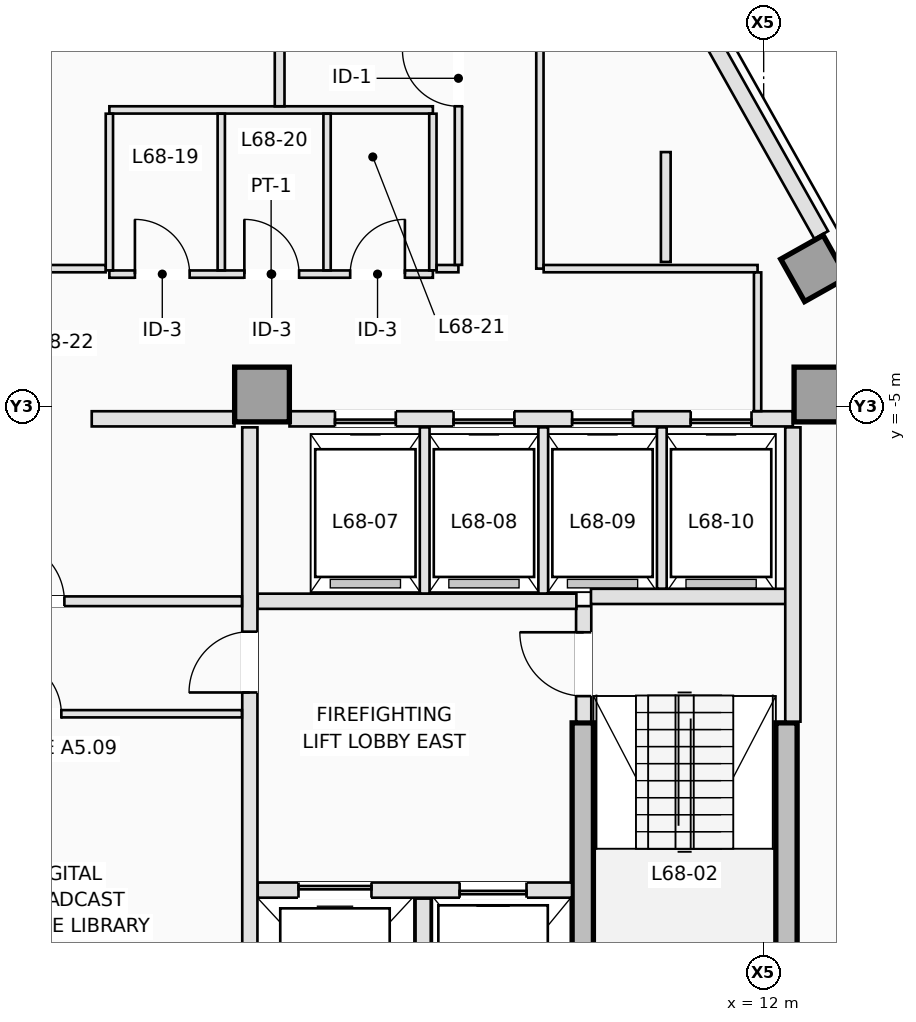
"""IFC4 building model, lengths in metres.
Left out: names, types, materials, properties, quantities, classifications, styles, units other than length and angle.
Written with IfcOpenShell. Run it as: python <this file> out.ifc"""

import sys

from ifc_helpers import new_model, si_unit, direction, frame, frame_2d, origin, origin_2d, place, context, subcontext, project, spatial, rectangle, extrude, element, fill, save


model = new_model("IFC4")
c1 = context("Model", 3, precision=1e-05, world=origin(), true_north=direction((0.0, 1.0)))
c2 = subcontext(c1, "Body", "Model", "MODEL_VIEW")
j1 = project(units=[si_unit("LENGTHUNIT", "METRE"), si_unit("PLANEANGLEUNIT", "RADIAN")], contexts=[c1])
p1 = place(None, origin())
s1 = spatial("IfcSite", under=j1, at=p1, CompositionType="ELEMENT")
p2 = place(p1, origin())
s2 = spatial("IfcBuilding", under=s1, at=p2, CompositionType="ELEMENT")
p3 = place(p2, frame((0.0, 0.0, 246.4)))
s3 = spatial("IfcBuildingStorey", under=s2, at=p3, CompositionType="ELEMENT", Elevation=246.4)
p4 = place(p3, frame((12.375, -15.675, 0.0), z_axis=(0.0, 0.0, 1.0), x_axis=(0.0, 1.0, 0.0)))
e1 = element("IfcWall", 1, at=p4, inside=s3, PredefinedType="SHEAR", context=c2, shape_type="SweptSolid", body=[
    extrude(rectangle(XDim=5.475, YDim=0.35, at=frame_2d((2.738, 0.0))), origin(), (0.0, 0.0, 1.0), 3.5),
])
p5 = place(p3, frame((9.025, -16.15, 0.0), z_axis=(0.0, 0.0, 1.0), x_axis=(0.0, 1.0, 0.0)))
e2 = element("IfcWall", 2, at=p5, inside=s3, PredefinedType="SHEAR", context=c2, shape_type="SweptSolid", body=[
    extrude(rectangle(XDim=5.95, YDim=0.35, at=frame_2d((2.975, 0.0))), origin(), (0.0, 0.0, 1.0), 3.5),
])
for number, where, z_axis, x_axis in (
    (3, (3.75, -4.8, 0.0), (0.0, 0.0, 1.0), (1.0, 0.0, 0.0)),
    (4, (12.95, -4.8, 0.0), (0.0, 0.0, 1.0), (1.0, 0.0, 0.0)),
):
    element("IfcColumn", number, at=place(p3, frame(where, z_axis=z_axis, x_axis=x_axis)), inside=s3, PredefinedType="COLUMN", context=c2, shape_type="SweptSolid", body=[
        extrude(rectangle(XDim=0.9, YDim=0.9, at=origin_2d()), origin(), (0.0, 0.0, 1.0), 3.5),
    ])
p6 = place(p3, frame((12.825, -2.727, 0.0), z_axis=(0.0, 0.0, 1.0), x_axis=(0.871575139605, 0.490261946333, 0.0)))
e5 = element("IfcColumn", 5, at=p6, inside=s3, PredefinedType="COLUMN", context=c2, shape_type="SweptSolid", body=[
    extrude(rectangle(XDim=0.8, YDim=0.8, at=origin_2d()), origin(), (0.0, 0.0, 1.0), 3.5),
])
p7 = place(p3, frame((10.869, 1.516, 0.0), z_axis=(0.0, 0.0, 1.0), x_axis=(0.490244825075, -0.871584770109, 0.0)))
e6 = element("IfcWall", 6, at=p7, inside=s3, PredefinedType="STANDARD", context=c2, shape_type="SweptSolid", body=[
    extrude(rectangle(XDim=4.237, YDim=0.26, at=frame_2d((2.119, 0.0))), origin(), (0.0, 0.0, 1.0), 3.25),
])
p8 = place(p3, frame((9.04, -10.18, 0.0), z_axis=(0.0, 0.0, 1.0), x_axis=(0.0, 1.0, 0.0)))
e7 = element("IfcWall", 7, at=p8, inside=s3, PredefinedType="PARTITIONING", context=c2, shape_type="SweptSolid", body=[
    extrude(rectangle(XDim=1.9, YDim=0.25, at=frame_2d((0.95, 0.0))), origin(), (0.0, 0.0, 1.0), 3.25),
])
p9 = place(p8, frame((0.42, 0.0, 0.0)))
e8 = element("IfcOpeningElement", 8, at=p9, cuts=e7, PredefinedType="OPENING", context=c2, shape_type="SweptSolid", body=[
    extrude(rectangle(XDim=1.05, YDim=2.15, at=frame_2d((0.525, 1.075))), frame((0.0, 0.135, 0.0), z_axis=(0.0, -1.0, 0.0), x_axis=(1.0, 0.0, 0.0)), (0.0, 0.0, 1.0), 0.27),
])
p10 = place(p3, frame((9.16, -8.12, 0.0), z_axis=(0.0, 0.0, 1.0), x_axis=(1.0, 0.0, 0.0)))
e9 = element("IfcWall", 9, at=p10, inside=s3, PredefinedType="PARTITIONING", context=c2, shape_type="SweptSolid", body=[
    extrude(rectangle(XDim=3.22, YDim=0.25, at=frame_2d((1.61, 0.0))), origin(), (0.0, 0.0, 1.0), 3.25),
])
p11 = place(p3, frame((12.48, -10.18, 0.0), z_axis=(0.0, 0.0, 1.0), x_axis=(0.0, 1.0, 0.0)))
e10 = element("IfcWall", 10, at=p11, inside=s3, PredefinedType="PARTITIONING", context=c2, shape_type="SweptSolid", body=[
    extrude(rectangle(XDim=4.84, YDim=0.25, at=frame_2d((2.42, 0.0))), origin(), (0.0, 0.0, 1.0), 3.25),
])
p12 = place(p3, frame((3.68, -12.95, 0.0), z_axis=(0.0, 0.0, 1.0), x_axis=(1.0, 0.0, 0.0)))
e11 = element("IfcWall", 11, at=p12, inside=s3, PredefinedType="PARTITIONING", context=c2, shape_type="SweptSolid", body=[
    extrude(rectangle(XDim=5.168, YDim=0.25, at=frame_2d((2.584, 0.0))), origin(), (0.0, 0.0, 1.0), 3.25),
])
p13 = place(p12, frame((3.32, 0.0, 0.0)))
e12 = element("IfcOpeningElement", 12, at=p13, cuts=e11, PredefinedType="OPENING", context=c2, shape_type="SweptSolid", body=[
    extrude(rectangle(XDim=1.1, YDim=2.15, at=frame_2d((0.55, 1.075))), frame((0.0, 0.135, 0.0), z_axis=(0.0, -1.0, 0.0), x_axis=(1.0, 0.0, 0.0)), (0.0, 0.0, 1.0), 0.27),
])
p14 = place(p12, frame((0.67, 0.0, 0.0)))
e13 = element("IfcOpeningElement", 13, at=p14, cuts=e11, PredefinedType="OPENING", context=c2, shape_type="SweptSolid", body=[
    extrude(rectangle(XDim=1.2, YDim=2.15, at=frame_2d((0.6, 1.075))), frame((0.0, 0.135, 0.0), z_axis=(0.0, -1.0, 0.0), x_axis=(1.0, 0.0, 0.0)), (0.0, 0.0, 1.0), 0.27),
])
p15 = place(p3, frame((6.4, -15.92, 0.0), z_axis=(0.0, 0.0, 1.0), x_axis=(0.0, 1.0, 0.0)))
e14 = element("IfcWall", 14, at=p15, inside=s3, PredefinedType="PARTITIONING", context=c2, shape_type="SweptSolid", body=[
    extrude(rectangle(XDim=2.83, YDim=0.25, at=frame_2d((1.415, 0.0))), origin(), (0.0, 0.0, 1.0), 3.25),
])
p16 = place(p3, frame((3.68, -8.2, 0.0), z_axis=(0.0, 0.0, 1.0), x_axis=(1.0, 0.0, 0.0)))
e15 = element("IfcWall", 15, at=p16, inside=s3, PredefinedType="PARTITIONING", context=c2, shape_type="SweptSolid", body=[
    extrude(rectangle(XDim=5.24, YDim=0.25, at=frame_2d((2.62, 0.0))), origin(), (0.0, 0.0, 1.0), 3.25),
])
p17 = place(p3, frame((3.55, -15.898, 0.0), z_axis=(0.0, 0.0, 1.0), x_axis=(0.0, 1.0, 0.0)))
e16 = element("IfcWall", 16, at=p17, inside=s3, PredefinedType="PARTITIONING", context=c2, shape_type="SweptSolid", body=[
    extrude(rectangle(XDim=10.558, YDim=0.25, at=frame_2d((5.279, 0.0))), origin(), (0.0, 0.0, 1.0), 3.25),
])
p18 = place(p17, frame((6.198, 0.0, 0.0)))
e17 = element("IfcOpeningElement", 17, at=p18, cuts=e16, PredefinedType="OPENING", context=c2, shape_type="SweptSolid", body=[
    extrude(rectangle(XDim=1.0, YDim=2.15, at=frame_2d((0.5, 1.075))), frame((0.0, 0.135, 0.0), z_axis=(0.0, -1.0, 0.0), x_axis=(1.0, 0.0, 0.0)), (0.0, 0.0, 1.0), 0.27),
])
p19 = place(p3, frame((4.202, -5.2, 0.0), z_axis=(0.0, 0.0, 1.0), x_axis=(1.0, 0.0, 0.0)))
e18 = element("IfcWall", 18, at=p19, inside=s3, PredefinedType="PARTITIONING", context=c2, shape_type="SweptSolid", body=[
    extrude(rectangle(XDim=8.278, YDim=0.25, at=frame_2d((4.139, 0.0))), origin(), (0.0, 0.0, 1.0), 3.25),
])
p20 = place(p19, frame((0.748, 0.0, 0.0)))
e19 = element("IfcOpeningElement", 19, at=p20, cuts=e18, PredefinedType="OPENING", context=c2, shape_type="SweptSolid", body=[
    extrude(rectangle(XDim=1.0, YDim=2.15, at=frame_2d((0.5, 1.075))), frame((0.0, 0.135, 0.0), z_axis=(0.0, -1.0, 0.0), x_axis=(1.0, 0.0, 0.0)), (0.0, 0.0, 1.0), 0.27),
])
p21 = place(p19, frame((2.698, 0.0, 0.0)))
e20 = element("IfcOpeningElement", 20, at=p21, cuts=e18, PredefinedType="OPENING", context=c2, shape_type="SweptSolid", body=[
    extrude(rectangle(XDim=1.0, YDim=2.15, at=frame_2d((0.5, 1.075))), frame((0.0, 0.135, 0.0), z_axis=(0.0, -1.0, 0.0), x_axis=(1.0, 0.0, 0.0)), (0.0, 0.0, 1.0), 0.27),
])
p22 = place(p19, frame((4.648, 0.0, 0.0)))
e21 = element("IfcOpeningElement", 21, at=p22, cuts=e18, PredefinedType="OPENING", context=c2, shape_type="SweptSolid", body=[
    extrude(rectangle(XDim=1.0, YDim=2.15, at=frame_2d((0.5, 1.075))), frame((0.0, 0.135, 0.0), z_axis=(0.0, -1.0, 0.0), x_axis=(1.0, 0.0, 0.0)), (0.0, 0.0, 1.0), 0.27),
])
p23 = place(p19, frame((6.598, 0.0, 0.0)))
e22 = element("IfcOpeningElement", 22, at=p23, cuts=e18, PredefinedType="OPENING", context=c2, shape_type="SweptSolid", body=[
    extrude(rectangle(XDim=1.0, YDim=2.15, at=frame_2d((0.5, 1.075))), frame((0.0, 0.135, 0.0), z_axis=(0.0, -1.0, 0.0), x_axis=(1.0, 0.0, 0.0)), (0.0, 0.0, 1.0), 0.27),
])
p24 = place(p3, frame((0.95, -5.2, 0.0), z_axis=(0.0, 0.0, 1.0), x_axis=(1.0, 0.0, 0.0)))
e23 = element("IfcWall", 23, at=p24, inside=s3, PredefinedType="PARTITIONING", context=c2, shape_type="SweptSolid", body=[
    extrude(rectangle(XDim=2.348, YDim=0.25, at=frame_2d((1.174, 0.0))), origin(), (0.0, 0.0, 1.0), 3.25),
])
for number, where, z_axis, x_axis in (
    (24, (6.425, -8.073, 0.0), (0.0, 0.0, 1.0), (0.0, 1.0, 0.0)),
    (25, (8.375, -8.073, 0.0), (0.0, 0.0, 1.0), (0.0, 1.0, 0.0)),
):
    element("IfcWall", number, at=place(p3, frame(where, z_axis=z_axis, x_axis=x_axis)), inside=s3, PredefinedType="PARTITIONING", context=c2, shape_type="SweptSolid", body=[
        extrude(rectangle(XDim=2.733, YDim=0.16, at=frame_2d((1.366, 0.0))), origin(), (0.0, 0.0, 1.0), 3.25),
    ])
p25 = place(p3, frame((10.325, -7.993, 0.0), z_axis=(0.0, 0.0, 1.0), x_axis=(0.0, 1.0, 0.0)))
e26 = element("IfcWall", 26, at=p25, inside=s3, PredefinedType="PARTITIONING", context=c2, shape_type="SweptSolid", body=[
    extrude(rectangle(XDim=2.653, YDim=0.16, at=frame_2d((1.326, 0.0))), origin(), (0.0, 0.0, 1.0), 3.25),
])
p26 = place(p3, frame((-3.42, -8.2, 0.0), z_axis=(0.0, 0.0, 1.0), x_axis=(1.0, 0.0, 0.0)))
e27 = element("IfcWall", 27, at=p26, inside=s3, PredefinedType="PARTITIONING", context=c2, shape_type="SweptSolid", body=[
    extrude(rectangle(XDim=6.84, YDim=0.16, at=frame_2d((3.42, 0.0))), origin(), (0.0, 0.0, 1.0), 3.25),
])
p27 = place(p26, frame((2.92, 0.0, 0.0)))
e28 = element("IfcOpeningElement", 28, at=p27, cuts=e27, PredefinedType="OPENING", context=c2, shape_type="SweptSolid", body=[
    extrude(rectangle(XDim=1.0, YDim=2.15, at=frame_2d((0.5, 1.075))), frame((0.0, 0.09, 0.0), z_axis=(0.0, -1.0, 0.0), x_axis=(1.0, 0.0, 0.0)), (0.0, 0.0, 1.0), 0.18),
])
p28 = place(p3, frame((-3.42, -10.05, 0.0), z_axis=(0.0, 0.0, 1.0), x_axis=(1.0, 0.0, 0.0)))
e29 = element("IfcWall", 29, at=p28, inside=s3, PredefinedType="PARTITIONING", context=c2, shape_type="SweptSolid", body=[
    extrude(rectangle(XDim=6.84, YDim=0.12, at=frame_2d((3.42, 0.0))), origin(), (0.0, 0.0, 1.0), 3.25),
])
p29 = place(p28, frame((2.95, 0.0, 0.0)))
e30 = element("IfcOpeningElement", 30, at=p29, cuts=e29, PredefinedType="OPENING", context=c2, shape_type="SweptSolid", body=[
    extrude(rectangle(XDim=0.92, YDim=2.12, at=frame_2d((0.46, 1.06))), frame((0.0, 0.07, 0.0), z_axis=(0.0, -1.0, 0.0), x_axis=(1.0, 0.0, 0.0)), (0.0, 0.0, 1.0), 0.14),
])
p30 = place(p3, frame((1.24, -2.82, 0.0), z_axis=(0.0, 0.0, 1.0), x_axis=(1.0, 0.0, 0.0)))
e31 = element("IfcWall", 31, at=p30, inside=s3, PredefinedType="PARTITIONING", context=c2, shape_type="SweptSolid", body=[
    extrude(rectangle(XDim=5.32, YDim=0.12, at=frame_2d((2.66, 0.0))), origin(), (0.0, 0.0, 1.0), 2.943),
])
p31 = place(p30, frame((0.42, 0.0, 0.0)))
e32 = element("IfcOpeningElement", 32, at=p31, cuts=e31, PredefinedType="OPENING", context=c2, shape_type="SweptSolid", body=[
    extrude(rectangle(XDim=0.9, YDim=2.12, at=frame_2d((0.45, 1.06))), frame((0.0, 0.07, 0.0), z_axis=(0.0, -1.0, 0.0), x_axis=(1.0, 0.0, 0.0)), (0.0, 0.0, 1.0), 0.14),
])
p32 = place(p30, frame((2.22, 0.0, 0.0)))
e33 = element("IfcOpeningElement", 33, at=p32, cuts=e31, PredefinedType="OPENING", context=c2, shape_type="SweptSolid", body=[
    extrude(rectangle(XDim=0.9, YDim=2.12, at=frame_2d((0.45, 1.06))), frame((0.0, 0.07, 0.0), z_axis=(0.0, -1.0, 0.0), x_axis=(1.0, 0.0, 0.0)), (0.0, 0.0, 1.0), 0.14),
])
p33 = place(p30, frame((3.96, 0.0, 0.0)))
e34 = element("IfcOpeningElement", 34, at=p33, cuts=e31, PredefinedType="OPENING", context=c2, shape_type="SweptSolid", body=[
    extrude(rectangle(XDim=0.9, YDim=2.12, at=frame_2d((0.45, 1.06))), frame((0.0, 0.07, 0.0), z_axis=(0.0, -1.0, 0.0), x_axis=(1.0, 0.0, 0.0)), (0.0, 0.0, 1.0), 0.14),
])
p34 = place(p3, frame((1.24, -0.12, 0.0), z_axis=(0.0, 0.0, 1.0), x_axis=(1.0, 0.0, 0.0)))
e35 = element("IfcWall", 35, at=p34, inside=s3, PredefinedType="PARTITIONING", context=c2, shape_type="SweptSolid", body=[
    extrude(rectangle(XDim=5.32, YDim=0.12, at=frame_2d((2.66, 0.0))), origin(), (0.0, 0.0, 1.0), 3.25),
])
for number, where, z_axis, x_axis in (
    (36, (1.24, -2.758, 0.0), (0.0, 0.0, 1.0), (0.0, 1.0, 0.0)),
    (37, (3.08, -2.758, 0.0), (0.0, 0.0, 1.0), (0.0, 1.0, 0.0)),
    (38, (4.82, -2.758, 0.0), (0.0, 0.0, 1.0), (0.0, 1.0, 0.0)),
    (39, (6.56, -2.758, 0.0), (0.0, 0.0, 1.0), (0.0, 1.0, 0.0)),
):
    element("IfcWall", number, at=place(p3, frame(where, z_axis=z_axis, x_axis=x_axis)), inside=s3, PredefinedType="PARTITIONING", context=c2, shape_type="SweptSolid", body=[
        extrude(rectangle(XDim=2.576, YDim=0.12, at=frame_2d((1.288, 0.0))), origin(), (0.0, 0.0, 1.0), 3.25),
    ])
p35 = place(p3, frame((-7.568, -2.73, 0.0), z_axis=(0.0, 0.0, 1.0), x_axis=(1.0, 0.0, 0.0)))
e40 = element("IfcWall", 40, at=p35, inside=s3, PredefinedType="PARTITIONING", context=c2, shape_type="SweptSolid", body=[
    extrude(rectangle(XDim=8.746, YDim=0.12, at=frame_2d((4.373, 0.0))), origin(), (0.0, 0.0, 1.0), 2.943),
])
p36 = place(p35, frame((6.264, 0.0, 0.0)))
e41 = element("IfcOpeningElement", 41, at=p36, cuts=e40, PredefinedType="OPENING", context=c2, shape_type="SweptSolid", body=[
    extrude(rectangle(XDim=0.92, YDim=2.12, at=frame_2d((0.46, 1.06))), frame((0.0, 0.07, 0.0), z_axis=(0.0, -1.0, 0.0), x_axis=(1.0, 0.0, 0.0)), (0.0, 0.0, 1.0), 0.14),
])
p37 = place(p35, frame((2.072, 0.0, 0.0)))
e42 = element("IfcOpeningElement", 42, at=p37, cuts=e40, PredefinedType="OPENING", context=c2, shape_type="SweptSolid", body=[
    extrude(rectangle(XDim=0.92, YDim=2.12, at=frame_2d((0.46, 1.06))), frame((0.0, 0.07, 0.0), z_axis=(0.0, -1.0, 0.0), x_axis=(1.0, 0.0, 0.0)), (0.0, 0.0, 1.0), 0.14),
])
p38 = place(p3, frame((6.622, -2.73, 0.0), z_axis=(0.0, 0.0, 1.0), x_axis=(1.0, 0.0, 0.0)))
e43 = element("IfcWall", 43, at=p38, inside=s3, PredefinedType="PARTITIONING", context=c2, shape_type="SweptSolid", body=[
    extrude(rectangle(XDim=0.358, YDim=0.12, at=frame_2d((0.179, 0.0))), origin(), (0.0, 0.0, 1.0), 3.25),
])
p39 = place(p3, frame((6.98, -2.668, 0.0), z_axis=(0.0, 0.0, 1.0), x_axis=(0.0, 1.0, 0.0)))
e44 = element("IfcWall", 44, at=p39, inside=s3, PredefinedType="PARTITIONING", context=c2, shape_type="SweptSolid", body=[
    extrude(rectangle(XDim=4.518, YDim=0.12, at=frame_2d((2.259, 0.0))), origin(), (0.0, 0.0, 1.0), 3.25),
])
p40 = place(p39, frame((2.608, 0.0, 0.0)))
e45 = element("IfcOpeningElement", 45, at=p40, cuts=e44, PredefinedType="OPENING", context=c2, shape_type="SweptSolid", body=[
    extrude(rectangle(XDim=0.92, YDim=2.12, at=frame_2d((0.46, 1.06))), frame((0.0, 0.07, 0.0), z_axis=(0.0, -1.0, 0.0), x_axis=(1.0, 0.0, 0.0)), (0.0, 0.0, 1.0), 0.14),
])
p41 = place(p3, frame((8.32, 1.788, 0.0), z_axis=(0.0, 0.0, 1.0), x_axis=(0.0, -1.0, 0.0)))
e46 = element("IfcWall", 46, at=p41, inside=s3, PredefinedType="PARTITIONING", context=c2, shape_type="SweptSolid", body=[
    extrude(rectangle(XDim=4.518, YDim=0.12, at=frame_2d((2.259, 0.0))), origin(), (0.0, 0.0, 1.0), 3.25),
])
p42 = place(p3, frame((8.382, -2.73, 0.0), z_axis=(0.0, 0.0, 1.0), x_axis=(1.0, 0.0, 0.0)))
e47 = element("IfcWall", 47, at=p42, inside=s3, PredefinedType="PARTITIONING", context=c2, shape_type="SweptSolid", body=[
    extrude(rectangle(XDim=3.518, YDim=0.12, at=frame_2d((1.759, 0.0))), origin(), (0.0, 0.0, 1.0), 3.25),
])
p43 = place(p3, frame((11.9, -2.792, 0.0), z_axis=(0.0, 0.0, 1.0), x_axis=(0.0, -1.0, 0.0)))
e48 = element("IfcWall", 48, at=p43, inside=s3, PredefinedType="PARTITIONING", context=c2, shape_type="SweptSolid", body=[
    extrude(rectangle(XDim=2.281, YDim=0.12, at=frame_2d((1.141, 0.0))), origin(), (0.0, 0.0, 1.0), 3.25),
])
p44 = place(p3, frame((4.04, 7.312, 0.0), z_axis=(0.0, 0.0, 1.0), x_axis=(0.0, -1.0, 0.0)))
e49 = element("IfcWall", 49, at=p44, inside=s3, PredefinedType="PARTITIONING", context=c2, shape_type="SweptSolid", body=[
    extrude(rectangle(XDim=7.372, YDim=0.16, at=frame_2d((3.686, 0.0))), origin(), (0.0, 0.0, 1.0), 3.25),
])
p45 = place(p3, frame((10.39, -0.813, 0.0), z_axis=(0.0, 0.0, 1.0), x_axis=(0.0, -1.0, 0.0)))
e50 = element("IfcWall", 50, at=p45, inside=s3, PredefinedType="PARTITIONING", context=c2, shape_type="SweptSolid", body=[
    extrude(rectangle(XDim=1.807, YDim=0.16, at=frame_2d((0.903, 0.0))), origin(), (0.0, 0.0, 1.0), 3.25),
])
p46 = place(p20, origin())
e51 = element("IfcDoor", 51, at=p46, inside=s3, OperationType="SLIDING_TO_RIGHT", PredefinedType="DOOR", context=c2, shape_type="SweptSolid", body=[
    extrude(rectangle(XDim=1.0, YDim=2.15, at=frame_2d((0.5, 1.075))), frame((0.0, 0.025, 0.0), z_axis=(0.0, -1.0, 0.0), x_axis=(1.0, 0.0, 0.0)), (0.0, 0.0, 1.0), 0.05),
])
fill(e19, e51)
p47 = place(p21, origin())
e52 = element("IfcDoor", 52, at=p47, inside=s3, OperationType="SLIDING_TO_RIGHT", PredefinedType="DOOR", context=c2, shape_type="SweptSolid", body=[
    extrude(rectangle(XDim=1.0, YDim=2.15, at=frame_2d((0.5, 1.075))), frame((0.0, 0.025, 0.0), z_axis=(0.0, -1.0, 0.0), x_axis=(1.0, 0.0, 0.0)), (0.0, 0.0, 1.0), 0.05),
])
fill(e20, e52)
p48 = place(p22, origin())
e53 = element("IfcDoor", 53, at=p48, inside=s3, OperationType="SLIDING_TO_RIGHT", PredefinedType="DOOR", context=c2, shape_type="SweptSolid", body=[
    extrude(rectangle(XDim=1.0, YDim=2.15, at=frame_2d((0.5, 1.075))), frame((0.0, 0.025, 0.0), z_axis=(0.0, -1.0, 0.0), x_axis=(1.0, 0.0, 0.0)), (0.0, 0.0, 1.0), 0.05),
])
fill(e21, e53)
p49 = place(p23, origin())
e54 = element("IfcDoor", 54, at=p49, inside=s3, OperationType="SLIDING_TO_RIGHT", PredefinedType="DOOR", context=c2, shape_type="SweptSolid", body=[
    extrude(rectangle(XDim=1.0, YDim=2.15, at=frame_2d((0.5, 1.075))), frame((0.0, 0.025, 0.0), z_axis=(0.0, -1.0, 0.0), x_axis=(1.0, 0.0, 0.0)), (0.0, 0.0, 1.0), 0.05),
])
fill(e22, e54)
p50 = place(p13, origin())
e55 = element("IfcDoor", 55, at=p50, inside=s3, OperationType="SLIDING_TO_RIGHT", PredefinedType="DOOR", context=c2, shape_type="SweptSolid", body=[
    extrude(rectangle(XDim=1.1, YDim=2.15, at=frame_2d((0.55, 1.075))), frame((0.0, 0.025, 0.0), z_axis=(0.0, -1.0, 0.0), x_axis=(1.0, 0.0, 0.0)), (0.0, 0.0, 1.0), 0.05),
])
fill(e12, e55)
p51 = place(p14, origin())
e56 = element("IfcDoor", 56, at=p51, inside=s3, OperationType="SLIDING_TO_LEFT", PredefinedType="DOOR", context=c2, shape_type="SweptSolid", body=[
    extrude(rectangle(XDim=1.2, YDim=2.15, at=frame_2d((0.6, 1.075))), frame((0.0, 0.025, 0.0), z_axis=(0.0, -1.0, 0.0), x_axis=(1.0, 0.0, 0.0)), (0.0, 0.0, 1.0), 0.05),
])
fill(e13, e56)
p52 = place(p9, origin())
e57 = element("IfcDoor", 57, at=p52, inside=s3, OperationType="SINGLE_SWING_RIGHT", PredefinedType="DOOR", context=c2, shape_type="SweptSolid", body=[
    extrude(rectangle(XDim=1.05, YDim=2.15, at=frame_2d((0.525, 1.075))), frame((0.0, 0.025, 0.0), z_axis=(0.0, -1.0, 0.0), x_axis=(1.0, 0.0, 0.0)), (0.0, 0.0, 1.0), 0.05),
])
fill(e8, e57)
p53 = place(p18, origin())
e58 = element("IfcDoor", 58, at=p53, inside=s3, OperationType="SINGLE_SWING_LEFT", PredefinedType="DOOR", context=c2, shape_type="SweptSolid", body=[
    extrude(rectangle(XDim=1.0, YDim=2.15, at=frame_2d((0.5, 1.075))), frame((0.0, 0.025, 0.0), z_axis=(0.0, -1.0, 0.0), x_axis=(1.0, 0.0, 0.0)), (0.0, 0.0, 1.0), 0.05),
])
fill(e17, e58)
p54 = place(p27, origin())
e59 = element("IfcDoor", 59, at=p54, inside=s3, OperationType="SINGLE_SWING_LEFT", PredefinedType="DOOR", context=c2, shape_type="SweptSolid", body=[
    extrude(rectangle(XDim=1.0, YDim=2.15, at=frame_2d((0.5, 1.075))), frame((0.0, 0.025, 0.0), z_axis=(0.0, -1.0, 0.0), x_axis=(1.0, 0.0, 0.0)), (0.0, 0.0, 1.0), 0.05),
])
fill(e28, e59)
p55 = place(p29, origin())
e60 = element("IfcDoor", 60, at=p55, inside=s3, OperationType="SINGLE_SWING_LEFT", PredefinedType="DOOR", context=c2, shape_type="SweptSolid", body=[
    extrude(rectangle(XDim=0.92, YDim=2.12, at=frame_2d((0.46, 1.06))), frame((0.0, 0.025, 0.0), z_axis=(0.0, -1.0, 0.0), x_axis=(1.0, 0.0, 0.0)), (0.0, 0.0, 1.0), 0.05),
])
fill(e30, e60)
p56 = place(p31, origin())
e61 = element("IfcDoor", 61, at=p56, inside=s3, OperationType="SINGLE_SWING_LEFT", PredefinedType="DOOR", context=c2, shape_type="SweptSolid", body=[
    extrude(rectangle(XDim=0.9, YDim=2.12, at=frame_2d((0.45, 1.06))), frame((0.0, 0.025, 0.0), z_axis=(0.0, -1.0, 0.0), x_axis=(1.0, 0.0, 0.0)), (0.0, 0.0, 1.0), 0.05),
])
fill(e32, e61)
p57 = place(p32, origin())
e62 = element("IfcDoor", 62, at=p57, inside=s3, OperationType="SINGLE_SWING_LEFT", PredefinedType="DOOR", context=c2, shape_type="SweptSolid", body=[
    extrude(rectangle(XDim=0.9, YDim=2.12, at=frame_2d((0.45, 1.06))), frame((0.0, 0.025, 0.0), z_axis=(0.0, -1.0, 0.0), x_axis=(1.0, 0.0, 0.0)), (0.0, 0.0, 1.0), 0.05),
])
fill(e33, e62)
p58 = place(p33, origin())
e63 = element("IfcDoor", 63, at=p58, inside=s3, OperationType="SINGLE_SWING_RIGHT", PredefinedType="DOOR", context=c2, shape_type="SweptSolid", body=[
    extrude(rectangle(XDim=0.9, YDim=2.12, at=frame_2d((0.45, 1.06))), frame((0.0, 0.025, 0.0), z_axis=(0.0, -1.0, 0.0), x_axis=(1.0, 0.0, 0.0)), (0.0, 0.0, 1.0), 0.05),
])
fill(e34, e63)
p59 = place(p40, origin())
e64 = element("IfcDoor", 64, at=p59, inside=s3, OperationType="SINGLE_SWING_RIGHT", PredefinedType="DOOR", context=c2, shape_type="SweptSolid", body=[
    extrude(rectangle(XDim=0.92, YDim=2.12, at=frame_2d((0.46, 1.06))), frame((0.0, 0.025, 0.0), z_axis=(0.0, -1.0, 0.0), x_axis=(1.0, 0.0, 0.0)), (0.0, 0.0, 1.0), 0.05),
])
fill(e45, e64)
save(model, sys.argv[1])
